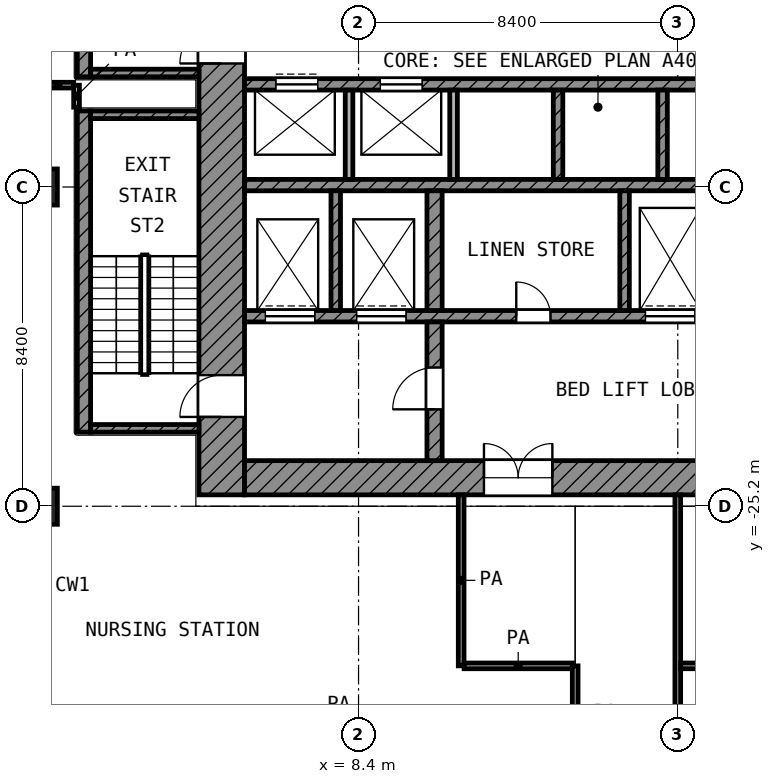
"""IFC4 building model, lengths in metres.
Left out: names, types, materials, properties, quantities, classifications, styles, units other than length and angle.
Written with IfcOpenShell. Run it as: python <this file> out.ifc"""

import sys

from ifc_helpers import new_model, si_unit, direction, frame, frame_2d, origin, origin_2d, place, context, subcontext, project, spatial, rectangle, extrude, element, fill, save


model = new_model("IFC4")
c1 = context("Model", 3, precision=1e-05, world=origin(), true_north=direction((0.0, 1.0)))
c2 = subcontext(c1, "Body", "Model", "MODEL_VIEW")
j1 = project(units=[si_unit("LENGTHUNIT", "METRE"), si_unit("PLANEANGLEUNIT", "RADIAN")], contexts=[c1])
p1 = place(None, origin())
s1 = spatial("IfcSite", under=j1, at=p1, CompositionType="ELEMENT")
p2 = place(p1, origin())
s2 = spatial("IfcBuilding", under=s1, at=p2, CompositionType="ELEMENT")
p3 = place(p2, frame((0.0, 0.0, 204.6)))
s3 = spatial("IfcBuildingStorey", under=s2, at=p3, CompositionType="ELEMENT", Elevation=204.6)
for number, where, z_axis, x_axis in (
    (1, (0.0, -16.8, 0.0), (0.0, 0.0, 1.0), (1.0, 0.0, 0.0)),
    (2, (0.0, -25.2, 0.0), (0.0, 0.0, 1.0), (1.0, 0.0, 0.0)),
):
    element("IfcColumn", number, at=place(p3, frame(where, z_axis=z_axis, x_axis=x_axis)), inside=s3, PredefinedType="COLUMN", context=c2, shape_type="SweptSolid", body=[
        extrude(rectangle(XDim=0.95, YDim=0.95, at=origin_2d()), origin(), (0.0, 0.0, 1.0), 4.2),
    ])
p4 = place(p3, frame((4.8, -24.9, 0.0), z_axis=(0.0, 0.0, 1.0), x_axis=(0.0, 1.0, 0.0)))
e3 = element("IfcWall", 3, at=p4, inside=s3, PredefinedType="SHEAR", context=c2, shape_type="SweptSolid", body=[
    extrude(rectangle(XDim=19.5, YDim=1.2, at=frame_2d((9.75, 0.0))), origin(), (0.0, 0.0, 1.0), 3.6),
])
p5 = place(p4, frame((11.35, 0.0, 0.0)))
e4 = element("IfcOpeningElement", 4, at=p5, cuts=e3, PredefinedType="OPENING", context=c2, shape_type="SweptSolid", body=[
    extrude(rectangle(XDim=1.1, YDim=2.1, at=frame_2d((0.55, 1.05))), frame((0.0, 0.61, 0.0), z_axis=(0.0, -1.0, 0.0), x_axis=(1.0, 0.0, 0.0)), (0.0, 0.0, 1.0), 1.22),
])
p6 = place(p4, frame((2.05, 0.0, 0.0)))
e5 = element("IfcOpeningElement", 5, at=p6, cuts=e3, PredefinedType="OPENING", context=c2, shape_type="SweptSolid", body=[
    extrude(rectangle(XDim=1.1, YDim=2.1, at=frame_2d((0.55, 1.05))), frame((0.0, 0.61, 0.0), z_axis=(0.0, -1.0, 0.0), x_axis=(1.0, 0.0, 0.0)), (0.0, 0.0, 1.0), 1.22),
])
p7 = place(p3, frame((5.4, -24.45, 0.0), z_axis=(0.0, 0.0, 1.0), x_axis=(1.0, 0.0, 0.0)))
e6 = element("IfcWall", 6, at=p7, inside=s3, PredefinedType="SHEAR", context=c2, shape_type="SweptSolid", body=[
    extrude(rectangle(XDim=18.6, YDim=0.9, at=frame_2d((9.3, 0.0))), origin(), (0.0, 0.0, 1.0), 3.6),
])
p8 = place(p7, frame((6.3, 0.0, 0.0)))
e7 = element("IfcOpeningElement", 7, at=p8, cuts=e6, PredefinedType="OPENING", context=c2, shape_type="SweptSolid", body=[
    extrude(rectangle(XDim=1.8, YDim=2.1, at=frame_2d((0.9, 1.05))), frame((0.0, 0.46, 0.0), z_axis=(0.0, -1.0, 0.0), x_axis=(1.0, 0.0, 0.0)), (0.0, 0.0, 1.0), 0.92),
])
p9 = place(p3, frame((5.4, -14.1, 0.0), z_axis=(0.0, 0.0, 1.0), x_axis=(1.0, 0.0, 0.0)))
e8 = element("IfcWall", 8, at=p9, inside=s3, PredefinedType="SHEAR", context=c2, shape_type="SweptSolid", body=[
    extrude(rectangle(XDim=16.65, YDim=0.3, at=frame_2d((8.325, 0.0))), origin(), (0.0, 0.0, 1.0), 3.6),
])
p10 = place(p9, frame((0.825, 0.0, 0.0)))
e9 = element("IfcOpeningElement", 9, at=p10, cuts=e8, PredefinedType="OPENING", context=c2, shape_type="SweptSolid", body=[
    extrude(rectangle(XDim=1.1, YDim=2.1, at=frame_2d((0.55, 1.05))), frame((0.0, 0.16, 0.0), z_axis=(0.0, -1.0, 0.0), x_axis=(1.0, 0.0, 0.0)), (0.0, 0.0, 1.0), 0.32),
])
p11 = place(p9, frame((3.575, 0.0, 0.0)))
e10 = element("IfcOpeningElement", 10, at=p11, cuts=e8, PredefinedType="OPENING", context=c2, shape_type="SweptSolid", body=[
    extrude(rectangle(XDim=1.1, YDim=2.1, at=frame_2d((0.55, 1.05))), frame((0.0, 0.16, 0.0), z_axis=(0.0, -1.0, 0.0), x_axis=(1.0, 0.0, 0.0)), (0.0, 0.0, 1.0), 0.32),
])
p12 = place(p3, frame((5.4, -16.75, 0.0), z_axis=(0.0, 0.0, 1.0), x_axis=(1.0, 0.0, 0.0)))
e11 = element("IfcWall", 11, at=p12, inside=s3, PredefinedType="SHEAR", context=c2, shape_type="SweptSolid", body=[
    extrude(rectangle(XDim=16.65, YDim=0.3, at=frame_2d((8.325, 0.0))), origin(), (0.0, 0.0, 1.0), 3.6),
])
p13 = place(p3, frame((5.4, -20.2, 0.0), z_axis=(0.0, 0.0, 1.0), x_axis=(1.0, 0.0, 0.0)))
e12 = element("IfcWall", 12, at=p13, inside=s3, PredefinedType="SHEAR", context=c2, shape_type="SweptSolid", body=[
    extrude(rectangle(XDim=14.65, YDim=0.3, at=frame_2d((7.325, 0.0))), origin(), (0.0, 0.0, 1.0), 3.6),
])
p14 = place(p13, frame((10.55, 0.0, 0.0)))
e13 = element("IfcOpeningElement", 13, at=p14, cuts=e12, PredefinedType="OPENING", context=c2, shape_type="SweptSolid", body=[
    extrude(rectangle(XDim=1.3, YDim=2.1, at=frame_2d((0.65, 1.05))), frame((0.0, 0.16, 0.0), z_axis=(0.0, -1.0, 0.0), x_axis=(1.0, 0.0, 0.0)), (0.0, 0.0, 1.0), 0.32),
])
p15 = place(p13, frame((12.95, 0.0, 0.0)))
e14 = element("IfcOpeningElement", 14, at=p15, cuts=e12, PredefinedType="OPENING", context=c2, shape_type="SweptSolid", body=[
    extrude(rectangle(XDim=1.3, YDim=2.1, at=frame_2d((0.65, 1.05))), frame((0.0, 0.16, 0.0), z_axis=(0.0, -1.0, 0.0), x_axis=(1.0, 0.0, 0.0)), (0.0, 0.0, 1.0), 0.32),
])
p16 = place(p13, frame((0.55, 0.0, 0.0)))
e15 = element("IfcOpeningElement", 15, at=p16, cuts=e12, PredefinedType="OPENING", context=c2, shape_type="SweptSolid", body=[
    extrude(rectangle(XDim=1.3, YDim=2.1, at=frame_2d((0.65, 1.05))), frame((0.0, 0.16, 0.0), z_axis=(0.0, -1.0, 0.0), x_axis=(1.0, 0.0, 0.0)), (0.0, 0.0, 1.0), 0.32),
])
p17 = place(p13, frame((2.95, 0.0, 0.0)))
e16 = element("IfcOpeningElement", 16, at=p17, cuts=e12, PredefinedType="OPENING", context=c2, shape_type="SweptSolid", body=[
    extrude(rectangle(XDim=1.3, YDim=2.1, at=frame_2d((0.65, 1.05))), frame((0.0, 0.16, 0.0), z_axis=(0.0, -1.0, 0.0), x_axis=(1.0, 0.0, 0.0)), (0.0, 0.0, 1.0), 0.32),
])
p18 = place(p13, frame((7.15, 0.0, 0.0)))
e17 = element("IfcOpeningElement", 17, at=p18, cuts=e12, PredefinedType="OPENING", context=c2, shape_type="SweptSolid", body=[
    extrude(rectangle(XDim=0.9, YDim=2.1, at=frame_2d((0.45, 1.05))), frame((0.0, 0.16, 0.0), z_axis=(0.0, -1.0, 0.0), x_axis=(1.0, 0.0, 0.0)), (0.0, 0.0, 1.0), 0.32),
])
p19 = place(p3, frame((10.4, -24.0, 0.0), z_axis=(0.0, 0.0, 1.0), x_axis=(0.0, 1.0, 0.0)))
e18 = element("IfcWall", 18, at=p19, inside=s3, PredefinedType="SHEAR", context=c2, shape_type="SweptSolid", body=[
    extrude(rectangle(XDim=3.65, YDim=0.4, at=frame_2d((1.825, 0.0))), origin(), (0.0, 0.0, 1.0), 3.6),
])
p20 = place(p19, frame((1.35, 0.0, 0.0)))
e19 = element("IfcOpeningElement", 19, at=p20, cuts=e18, PredefinedType="OPENING", context=c2, shape_type="SweptSolid", body=[
    extrude(rectangle(XDim=1.1, YDim=2.1, at=frame_2d((0.55, 1.05))), frame((0.0, 0.21, 0.0), z_axis=(0.0, -1.0, 0.0), x_axis=(1.0, 0.0, 0.0)), (0.0, 0.0, 1.0), 0.42),
])
p21 = place(p3, frame((10.4, -20.05, 0.0), z_axis=(0.0, 0.0, 1.0), x_axis=(0.0, 1.0, 0.0)))
e20 = element("IfcWall", 20, at=p21, inside=s3, PredefinedType="SHEAR", context=c2, shape_type="SweptSolid", body=[
    extrude(rectangle(XDim=3.15, YDim=0.4, at=frame_2d((1.575, 0.0))), origin(), (0.0, 0.0, 1.0), 3.6),
])
for number, where, z_axis, x_axis in (
    (21, (7.8, -20.05, 0.0), (0.0, 0.0, 1.0), (0.0, 1.0, 0.0)),
    (22, (15.4, -20.05, 0.0), (0.0, 0.0, 1.0), (0.0, 1.0, 0.0)),
):
    element("IfcWall", number, at=place(p3, frame(where, z_axis=z_axis, x_axis=x_axis)), inside=s3, PredefinedType="SHEAR", context=c2, shape_type="SweptSolid", body=[
        extrude(rectangle(XDim=3.15, YDim=0.25, at=frame_2d((1.575, 0.0))), origin(), (0.0, 0.0, 1.0), 3.6),
    ])
for number, where, z_axis, x_axis in (
    (23, (8.15, -16.6, 0.0), (0.0, 0.0, 1.0), (0.0, 1.0, 0.0)),
    (24, (10.9, -16.6, 0.0), (0.0, 0.0, 1.0), (0.0, 1.0, 0.0)),
):
    element("IfcWall", number, at=place(p3, frame(where, z_axis=z_axis, x_axis=x_axis)), inside=s3, PredefinedType="PARTITIONING", context=c2, shape_type="SweptSolid", body=[
        extrude(rectangle(XDim=2.35, YDim=0.2, at=frame_2d((1.175, 0.0))), origin(), (0.0, 0.0, 1.0), 3.6),
    ])
for number, where, z_axis, x_axis in (
    (25, (13.65, -16.6, 0.0), (0.0, 0.0, 1.0), (0.0, 1.0, 0.0)),
    (26, (16.4, -16.6, 0.0), (0.0, 0.0, 1.0), (0.0, 1.0, 0.0)),
):
    element("IfcWall", number, at=place(p3, frame(where, z_axis=z_axis, x_axis=x_axis)), inside=s3, PredefinedType="SHEAR", context=c2, shape_type="SweptSolid", body=[
        extrude(rectangle(XDim=2.35, YDim=0.25, at=frame_2d((1.175, 0.0))), origin(), (0.0, 0.0, 1.0), 3.6),
    ])
p22 = place(p3, frame((1.175, -13.9, 0.0), z_axis=(0.0, 0.0, 1.0), x_axis=(0.0, 1.0, 0.0)))
e27 = element("IfcWall", 27, at=p22, inside=s3, PredefinedType="SHEAR", context=c2, shape_type="SweptSolid", body=[
    extrude(rectangle(XDim=8.45, YDim=0.35, at=frame_2d((4.225, 0.0))), origin(), (0.0, 0.0, 1.0), 3.6),
])
p23 = place(p3, frame((1.35, -13.8, 0.0), z_axis=(0.0, 0.0, 1.0), x_axis=(1.0, 0.0, 0.0)))
e28 = element("IfcWall", 28, at=p23, inside=s3, PredefinedType="SHEAR", context=c2, shape_type="SweptSolid", body=[
    extrude(rectangle(XDim=2.85, YDim=0.2, at=frame_2d((1.425, 0.0))), origin(), (0.0, 0.0, 1.0), 3.6),
])
p24 = place(p3, frame((1.175, -23.25, 0.0), z_axis=(0.0, 0.0, 1.0), x_axis=(0.0, 1.0, 0.0)))
e29 = element("IfcWall", 29, at=p24, inside=s3, PredefinedType="SHEAR", context=c2, shape_type="SweptSolid", body=[
    extrude(rectangle(XDim=8.45, YDim=0.35, at=frame_2d((4.225, 0.0))), origin(), (0.0, 0.0, 1.0), 3.6),
])
for number, where, z_axis, x_axis in (
    (30, (1.35, -14.9, 0.0), (0.0, 0.0, 1.0), (1.0, 0.0, 0.0)),
    (31, (1.35, -23.15, 0.0), (0.0, 0.0, 1.0), (1.0, 0.0, 0.0)),
):
    element("IfcWall", number, at=place(p3, frame(where, z_axis=z_axis, x_axis=x_axis)), inside=s3, PredefinedType="SHEAR", context=c2, shape_type="SweptSolid", body=[
        extrude(rectangle(XDim=2.85, YDim=0.2, at=frame_2d((1.425, 0.0))), origin(), (0.0, 0.0, 1.0), 3.6),
    ])
p25 = place(p3, frame((11.177, -29.4, 0.0), z_axis=(0.0, 0.0, 1.0), x_axis=(1.0, 0.0, 0.0)))
e32 = element("IfcWall", 32, at=p25, inside=s3, PredefinedType="PARTITIONING", context=c2, shape_type="SweptSolid", body=[
    extrude(rectangle(XDim=2.848, YDim=0.15, at=frame_2d((1.424, 0.0))), origin(), (0.0, 0.0, 1.0), 3.6),
])
p26 = place(p3, frame((16.875, -29.4, 0.0), z_axis=(0.0, 0.0, 1.0), x_axis=(1.0, 0.0, 0.0)))
e33 = element("IfcWall", 33, at=p26, inside=s3, PredefinedType="PARTITIONING", context=c2, shape_type="SweptSolid", body=[
    extrude(rectangle(XDim=12.45, YDim=0.15, at=frame_2d((6.225, 0.0))), origin(), (0.0, 0.0, 1.0), 3.6),
])
p27 = place(p3, frame((0.08, -14.12, 0.0), z_axis=(0.0, 0.0, 1.0), x_axis=(1.0, 0.0, 0.0)))
e34 = element("IfcWall", 34, at=p27, inside=s3, PredefinedType="PARTITIONING", context=c2, shape_type="SweptSolid", body=[
    extrude(rectangle(XDim=0.824, YDim=0.15, at=frame_2d((0.412, 0.0))), origin(), (0.0, 0.0, 1.0), 3.6),
])
p28 = place(p3, frame((0.98, -14.7, 0.0), z_axis=(0.0, 0.0, 1.0), x_axis=(0.0, 1.0, 0.0)))
e35 = element("IfcWall", 35, at=p28, inside=s3, PredefinedType="PARTITIONING", context=c2, shape_type="SweptSolid", body=[
    extrude(rectangle(XDim=0.578, YDim=0.15, at=frame_2d((0.289, 0.0))), origin(), (0.0, 0.0, 1.0), 3.6),
])
p29 = place(p3, frame((11.1, -29.399, 0.0), z_axis=(0.0, 0.0, 1.0), x_axis=(0.0, 1.0, 0.0)))
e36 = element("IfcWall", 36, at=p29, inside=s3, PredefinedType="PARTITIONING", context=c2, shape_type="SweptSolid", body=[
    extrude(rectangle(XDim=4.499, YDim=0.15, at=frame_2d((2.25, 0.0))), origin(), (0.0, 0.0, 1.0), 3.6),
])
p30 = place(p3, frame((14.1, -31.857, 0.0), z_axis=(0.0, 0.0, 1.0), x_axis=(0.0, 1.0, 0.0)))
e37 = element("IfcWall", 37, at=p30, inside=s3, PredefinedType="PARTITIONING", context=c2, shape_type="SweptSolid", body=[
    extrude(rectangle(XDim=2.457, YDim=0.15, at=frame_2d((1.229, 0.0))), origin(), (0.0, 0.0, 1.0), 3.6),
])
p31 = place(p3, frame((16.8, -54.52, 0.0), z_axis=(0.0, 0.0, 1.0), x_axis=(0.0, 1.0, 0.0)))
e38 = element("IfcWall", 38, at=p31, inside=s3, PredefinedType="PARTITIONING", context=c2, shape_type="SweptSolid", body=[
    extrude(rectangle(XDim=29.62, YDim=0.15, at=frame_2d((14.81, 0.0))), origin(), (0.0, 0.0, 1.0), 3.6),
])
p32 = place(p31, frame((21.52, 0.0, 0.0)))
e39 = element("IfcOpeningElement", 39, at=p32, cuts=e38, PredefinedType="OPENING", context=c2, shape_type="SweptSolid", body=[
    extrude(rectangle(XDim=1.2, YDim=2.1, at=frame_2d((0.6, 1.05))), frame((0.0, 0.085, 0.0), z_axis=(0.0, -1.0, 0.0), x_axis=(1.0, 0.0, 0.0)), (0.0, 0.0, 1.0), 0.17),
])
p33 = place(p31, frame((10.76, 0.0, 0.0)))
e40 = element("IfcOpeningElement", 40, at=p33, cuts=e38, PredefinedType="OPENING", context=c2, shape_type="SweptSolid", body=[
    extrude(rectangle(XDim=1.2, YDim=2.1, at=frame_2d((0.6, 1.05))), frame((0.0, 0.085, 0.0), z_axis=(0.0, -1.0, 0.0), x_axis=(1.0, 0.0, 0.0)), (0.0, 0.0, 1.0), 0.17),
])
p34 = place(p31, frame((9.2, 0.0, 0.0)))
e41 = element("IfcOpeningElement", 41, at=p34, cuts=e38, PredefinedType="OPENING", context=c2, shape_type="SweptSolid", body=[
    extrude(rectangle(XDim=1.2, YDim=2.1, at=frame_2d((0.6, 1.05))), frame((0.0, 0.085, 0.0), z_axis=(0.0, -1.0, 0.0), x_axis=(1.0, 0.0, 0.0)), (0.0, 0.0, 1.0), 0.17),
])
p35 = place(p31, frame((7.99, 0.0, 0.0)))
e42 = element("IfcOpeningElement", 42, at=p35, cuts=e38, PredefinedType="OPENING", context=c2, shape_type="SweptSolid", body=[
    extrude(rectangle(XDim=0.9, YDim=2.1, at=frame_2d((0.45, 1.05))), frame((0.0, 0.085, 0.0), z_axis=(0.0, -1.0, 0.0), x_axis=(1.0, 0.0, 0.0)), (0.0, 0.0, 1.0), 0.17),
])
p36 = place(p31, frame((2.07, 0.0, 0.0)))
e43 = element("IfcOpeningElement", 43, at=p36, cuts=e38, PredefinedType="OPENING", context=c2, shape_type="SweptSolid", body=[
    extrude(rectangle(XDim=1.5, YDim=2.1, at=frame_2d((0.75, 1.05))), frame((0.0, 0.085, 0.0), z_axis=(0.0, -1.0, 0.0), x_axis=(1.0, 0.0, 0.0)), (0.0, 0.0, 1.0), 0.17),
])
p37 = place(p10, origin())
e44 = element("IfcDoor", 44, at=p37, inside=s3, OperationType="DOUBLE_DOOR_SLIDING", PredefinedType="DOOR", context=c2, shape_type="SweptSolid", body=[
    extrude(rectangle(XDim=1.1, YDim=2.1, at=frame_2d((0.55, 1.05))), frame((0.0, 0.025, 0.0), z_axis=(0.0, -1.0, 0.0), x_axis=(1.0, 0.0, 0.0)), (0.0, 0.0, 1.0), 0.05),
])
fill(e9, e44)
p38 = place(p11, origin())
e45 = element("IfcDoor", 45, at=p38, inside=s3, OperationType="DOUBLE_DOOR_SLIDING", PredefinedType="DOOR", context=c2, shape_type="SweptSolid", body=[
    extrude(rectangle(XDim=1.1, YDim=2.1, at=frame_2d((0.55, 1.05))), frame((0.0, 0.025, 0.0), z_axis=(0.0, -1.0, 0.0), x_axis=(1.0, 0.0, 0.0)), (0.0, 0.0, 1.0), 0.05),
])
fill(e10, e45)
p39 = place(p14, origin())
e46 = element("IfcDoor", 46, at=p39, inside=s3, OperationType="DOUBLE_DOOR_SLIDING", PredefinedType="DOOR", context=c2, shape_type="SweptSolid", body=[
    extrude(rectangle(XDim=1.3, YDim=2.1, at=frame_2d((0.65, 1.05))), frame((0.0, 0.025, 0.0), z_axis=(0.0, -1.0, 0.0), x_axis=(1.0, 0.0, 0.0)), (0.0, 0.0, 1.0), 0.05),
])
fill(e13, e46)
p40 = place(p16, origin())
e47 = element("IfcDoor", 47, at=p40, inside=s3, OperationType="DOUBLE_DOOR_SLIDING", PredefinedType="DOOR", context=c2, shape_type="SweptSolid", body=[
    extrude(rectangle(XDim=1.3, YDim=2.1, at=frame_2d((0.65, 1.05))), frame((0.0, 0.025, 0.0), z_axis=(0.0, -1.0, 0.0), x_axis=(1.0, 0.0, 0.0)), (0.0, 0.0, 1.0), 0.05),
])
fill(e15, e47)
p41 = place(p17, origin())
e48 = element("IfcDoor", 48, at=p41, inside=s3, OperationType="DOUBLE_DOOR_SLIDING", PredefinedType="DOOR", context=c2, shape_type="SweptSolid", body=[
    extrude(rectangle(XDim=1.3, YDim=2.1, at=frame_2d((0.65, 1.05))), frame((0.0, 0.025, 0.0), z_axis=(0.0, -1.0, 0.0), x_axis=(1.0, 0.0, 0.0)), (0.0, 0.0, 1.0), 0.05),
])
fill(e16, e48)
p42 = place(p5, origin())
e49 = element("IfcDoor", 49, at=p42, inside=s3, OperationType="SINGLE_SWING_LEFT", PredefinedType="DOOR", context=c2, shape_type="SweptSolid", body=[
    extrude(rectangle(XDim=1.1, YDim=2.1, at=frame_2d((0.55, 1.05))), frame((0.0, 0.025, 0.0), z_axis=(0.0, -1.0, 0.0), x_axis=(1.0, 0.0, 0.0)), (0.0, 0.0, 1.0), 0.05),
])
fill(e4, e49)
p43 = place(p6, origin())
e50 = element("IfcDoor", 50, at=p43, inside=s3, OperationType="SINGLE_SWING_LEFT", PredefinedType="DOOR", context=c2, shape_type="SweptSolid", body=[
    extrude(rectangle(XDim=1.1, YDim=2.1, at=frame_2d((0.55, 1.05))), frame((0.0, 0.025, 0.0), z_axis=(0.0, -1.0, 0.0), x_axis=(1.0, 0.0, 0.0)), (0.0, 0.0, 1.0), 0.05),
])
fill(e5, e50)
p44 = place(p20, origin())
e51 = element("IfcDoor", 51, at=p44, inside=s3, OperationType="SINGLE_SWING_LEFT", PredefinedType="DOOR", context=c2, shape_type="SweptSolid", body=[
    extrude(rectangle(XDim=1.1, YDim=2.1, at=frame_2d((0.55, 1.05))), frame((0.0, 0.025, 0.0), z_axis=(0.0, -1.0, 0.0), x_axis=(1.0, 0.0, 0.0)), (0.0, 0.0, 1.0), 0.05),
])
fill(e19, e51)
p45 = place(p8, origin())
e52 = element("IfcDoor", 52, at=p45, inside=s3, OperationType="DOUBLE_DOOR_SINGLE_SWING", PredefinedType="DOOR", context=c2, shape_type="SweptSolid", body=[
    extrude(rectangle(XDim=1.8, YDim=2.1, at=frame_2d((0.9, 1.05))), frame((0.0, 0.025, 0.0), z_axis=(0.0, -1.0, 0.0), x_axis=(1.0, 0.0, 0.0)), (0.0, 0.0, 1.0), 0.05),
])
fill(e7, e52)
p46 = place(p18, origin())
e53 = element("IfcDoor", 53, at=p46, inside=s3, OperationType="SINGLE_SWING_LEFT", PredefinedType="DOOR", context=c2, shape_type="SweptSolid", body=[
    extrude(rectangle(XDim=0.9, YDim=2.1, at=frame_2d((0.45, 1.05))), frame((0.0, 0.025, 0.0), z_axis=(0.0, -1.0, 0.0), x_axis=(1.0, 0.0, 0.0)), (0.0, 0.0, 1.0), 0.05),
])
fill(e17, e53)
save(model, sys.argv[1])
